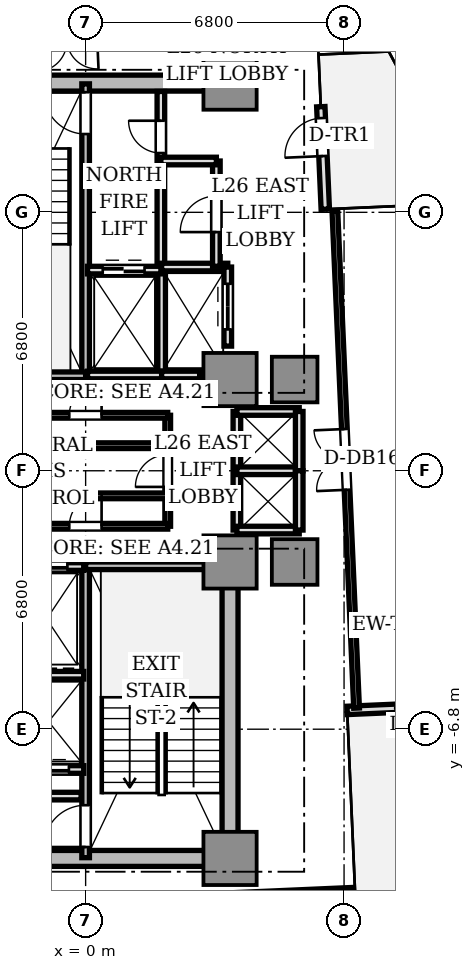
"""IFC4 building model, lengths in metres.
Left out: names, types, materials, properties, quantities, classifications, styles, units other than length and angle.
Written with IfcOpenShell. Run it as: python <this file> out.ifc"""

import sys

from ifc_helpers import new_model, si_unit, direction, frame, frame_2d, origin, origin_2d, place, context, subcontext, project, spatial, rectangle, extrude, source, transform, mapped, element, fill, save


model = new_model("IFC4")
c1 = context("Model", 3, precision=1e-05, world=origin(), true_north=direction((0.0, 1.0)))
c2 = subcontext(c1, "Body", "Model", "MODEL_VIEW")
j1 = project(units=[si_unit("LENGTHUNIT", "METRE"), si_unit("PLANEANGLEUNIT", "RADIAN")], contexts=[c1])
p1 = place(None, origin())
s1 = spatial("IfcSite", under=j1, at=p1, CompositionType="ELEMENT")
p2 = place(p1, origin())
s2 = spatial("IfcBuilding", under=s1, at=p2, CompositionType="ELEMENT")
p3 = place(p2, frame((0.0, 0.0, 96.9)))
s3 = spatial("IfcBuildingStorey", under=s2, at=p3, CompositionType="ELEMENT", Elevation=96.9)
for number, where, z_axis, x_axis in (
    (1, (-3.55, 10.2, 0.0), (0.0, 0.0, 1.0), (1.0, 0.0, 0.0)),
    (2, (-3.55, -10.2, 0.0), (0.0, 0.0, 1.0), (1.0, 0.0, 0.0)),
):
    element("IfcWall", number, at=place(p3, frame(where, z_axis=z_axis, x_axis=x_axis)), inside=s3, PredefinedType="SHEAR", context=c2, shape_type="SweptSolid", body=[
        extrude(rectangle(XDim=7.1, YDim=0.42, at=frame_2d((3.55, 0.0))), origin(), (0.0, 0.0, 1.0), 3.11),
    ])
p4 = place(p3, frame((3.8, -9.75, 0.0), z_axis=(0.0, 0.0, 1.0), x_axis=(0.0, 1.0, 0.0)))
e3 = element("IfcWall", 3, at=p4, inside=s3, PredefinedType="SHEAR", context=c2, shape_type="SweptSolid", body=[
    extrude(rectangle(XDim=6.9, YDim=0.42, at=frame_2d((3.45, 0.0))), origin(), (0.0, 0.0, 1.0), 3.11),
])
m1 = source(origin(), c2, "Body", "SweptSolid", [
    extrude(rectangle(XDim=1.4, YDim=1.4, at=origin_2d()), origin(), (0.0, 0.0, 1.0), 3.11),
])
for number, where, z_axis, x_axis in (
    (4, (3.8, 2.4, 0.0), (0.0, 0.0, 1.0), (1.0, 0.0, 0.0)),
    (5, (3.8, 10.2, 0.0), (0.0, 0.0, 1.0), (1.0, 0.0, 0.0)),
    (6, (3.8, -2.4, 0.0), (0.0, 0.0, 1.0), (1.0, 0.0, 0.0)),
    (7, (3.8, -10.2, 0.0), (0.0, 0.0, 1.0), (1.0, 0.0, 0.0)),
):
    element("IfcColumn", number, at=place(p3, frame(where, z_axis=z_axis, x_axis=x_axis)), inside=s3, PredefinedType="COLUMN", context=c2, shape_type="MappedRepresentation", body=[
        mapped(m1, transform((0.0, 0.0, 0.0), scale=1.0)),
    ])
m2 = source(origin(), c2, "Body", "SweptSolid", [
    extrude(rectangle(XDim=1.2, YDim=1.2, at=origin_2d()), origin(), (0.0, 0.0, 1.0), 3.11),
])
for number, where, z_axis, x_axis in (
    (8, (5.5, 2.4, 0.0), (0.0, 0.0, 1.0), (1.0, 0.0, 0.0)),
    (9, (5.5, -2.4, 0.0), (0.0, 0.0, 1.0), (1.0, 0.0, 0.0)),
):
    element("IfcColumn", number, at=place(p3, frame(where, z_axis=z_axis, x_axis=x_axis)), inside=s3, PredefinedType="COLUMN", context=c2, shape_type="MappedRepresentation", body=[
        mapped(m2, transform((0.0, 0.0, 0.0), scale=1.0)),
    ])
p5 = place(p3, frame((6.882, -6.306, 0.0), z_axis=(0.0, 0.0, 1.0), x_axis=(0.999045894436, 0.043672655174, 0.0)))
e10 = element("IfcWall", 10, at=p5, inside=s3, PredefinedType="STANDARD", context=c2, shape_type="SweptSolid", body=[
    extrude(rectangle(XDim=2.7, YDim=0.22, at=frame_2d((1.35, 0.0))), origin(), (0.0, 0.0, 1.0), 3.11),
])
p6 = place(p5, frame((1.4, 0.0, 0.0)))
e11 = element("IfcOpeningElement", 11, at=p6, cuts=e10, PredefinedType="OPENING", context=c2, shape_type="SweptSolid", body=[
    extrude(rectangle(XDim=1.0, YDim=2.2, at=frame_2d((0.5, 1.1))), frame((0.0, 0.12, 0.0), z_axis=(0.0, -1.0, 0.0), x_axis=(1.0, 0.0, 0.0)), (0.0, 0.0, 1.0), 0.24),
])
p7 = place(p3, frame((6.306, 6.882, 0.0), z_axis=(0.0, 0.0, 1.0), x_axis=(-0.043672655174, 0.999045894436, 0.0)))
e12 = element("IfcWall", 12, at=p7, inside=s3, PredefinedType="STANDARD", context=c2, shape_type="SweptSolid", body=[
    extrude(rectangle(XDim=2.7, YDim=0.22, at=frame_2d((1.35, 0.0))), origin(), (0.0, 0.0, 1.0), 3.11),
])
p8 = place(p7, frame((1.4, 0.0, 0.0)))
e13 = element("IfcOpeningElement", 13, at=p8, cuts=e12, PredefinedType="OPENING", context=c2, shape_type="SweptSolid", body=[
    extrude(rectangle(XDim=1.0, YDim=2.2, at=frame_2d((0.5, 1.1))), frame((0.0, 0.12, 0.0), z_axis=(0.0, -1.0, 0.0), x_axis=(1.0, 0.0, 0.0)), (0.0, 0.0, 1.0), 0.24),
])
p9 = place(p3, frame((0.0, 2.5, 0.0), z_axis=(0.0, 0.0, 1.0), x_axis=(0.0, 1.0, 0.0)))
e14 = element("IfcWall", 14, at=p9, inside=s3, PredefinedType="SOLIDWALL", context=c2, shape_type="SweptSolid", body=[
    extrude(rectangle(XDim=7.68, YDim=0.2, at=frame_2d((3.84, 0.0))), origin(), (0.0, 0.0, 1.0), 3.11),
])
p10 = place(p9, frame((6.36, 0.0, 0.0)))
e15 = element("IfcOpeningElement", 15, at=p10, cuts=e14, PredefinedType="OPENING", context=c2, shape_type="SweptSolid", body=[
    extrude(rectangle(XDim=1.1, YDim=2.15, at=frame_2d((0.55, 1.075))), frame((0.0, 0.11, 0.0), z_axis=(0.0, -1.0, 0.0), x_axis=(1.0, 0.0, 0.0)), (0.0, 0.0, 1.0), 0.22),
])
p11 = place(p3, frame((-3.72, 2.5, 0.0), z_axis=(0.0, 0.0, 1.0), x_axis=(1.0, 0.0, 0.0)))
e16 = element("IfcWall", 16, at=p11, inside=s3, PredefinedType="SOLIDWALL", context=c2, shape_type="SweptSolid", body=[
    extrude(rectangle(XDim=3.72, YDim=0.2, at=frame_2d((1.86, 0.0))), origin(), (0.0, 0.0, 1.0), 3.11),
])
p12 = place(p3, frame((0.0, -10.18, 0.0), z_axis=(0.0, 0.0, 1.0), x_axis=(0.0, 1.0, 0.0)))
e17 = element("IfcWall", 17, at=p12, inside=s3, PredefinedType="SOLIDWALL", context=c2, shape_type="SweptSolid", body=[
    extrude(rectangle(XDim=7.68, YDim=0.2, at=frame_2d((3.84, 0.0))), origin(), (0.0, 0.0, 1.0), 3.11),
])
p13 = place(p12, frame((0.28, 0.0, 0.0)))
e18 = element("IfcOpeningElement", 18, at=p13, cuts=e17, PredefinedType="OPENING", context=c2, shape_type="SweptSolid", body=[
    extrude(rectangle(XDim=1.1, YDim=2.15, at=frame_2d((0.55, 1.075))), frame((0.0, 0.11, 0.0), z_axis=(0.0, -1.0, 0.0), x_axis=(1.0, 0.0, 0.0)), (0.0, 0.0, 1.0), 0.22),
])
p14 = place(p3, frame((0.0, -2.5, 0.0), z_axis=(0.0, 0.0, 1.0), x_axis=(1.0, 0.0, 0.0)))
e19 = element("IfcWall", 19, at=p14, inside=s3, PredefinedType="SOLIDWALL", context=c2, shape_type="SweptSolid", body=[
    extrude(rectangle(XDim=3.72, YDim=0.2, at=frame_2d((1.86, 0.0))), origin(), (0.0, 0.0, 1.0), 3.11),
])
p15 = place(p3, frame((1.98, 5.32, 0.0), z_axis=(0.0, 0.0, 1.0), x_axis=(0.0, 1.0, 0.0)))
e20 = element("IfcWall", 20, at=p15, inside=s3, PredefinedType="SOLIDWALL", context=c2, shape_type="SweptSolid", body=[
    extrude(rectangle(XDim=4.66, YDim=0.2, at=frame_2d((2.33, 0.0))), origin(), (0.0, 0.0, 1.0), 2.66),
])
p16 = place(p15, frame((3.04, 0.0, 0.0)))
e21 = element("IfcOpeningElement", 21, at=p16, cuts=e20, PredefinedType="OPENING", context=c2, shape_type="SweptSolid", body=[
    extrude(rectangle(XDim=0.85, YDim=2.1, at=frame_2d((0.425, 1.05))), frame((0.0, 0.11, 0.0), z_axis=(0.0, -1.0, 0.0), x_axis=(1.0, 0.0, 0.0)), (0.0, 0.0, 1.0), 0.22),
])
p17 = place(p3, frame((2.0, 2.5, 0.0), z_axis=(0.0, 0.0, 1.0), x_axis=(0.0, 1.0, 0.0)))
e22 = element("IfcWall", 22, at=p17, inside=s3, PredefinedType="SOLIDWALL", context=c2, shape_type="SweptSolid", body=[
    extrude(rectangle(XDim=2.78, YDim=0.2, at=frame_2d((1.39, 0.0))), origin(), (0.0, 0.0, 1.0), 2.66),
])
p18 = place(p3, frame((0.05, 2.52, 0.0), z_axis=(0.0, 0.0, 1.0), x_axis=(1.0, 0.0, 0.0)))
e23 = element("IfcWall", 23, at=p18, inside=s3, PredefinedType="SOLIDWALL", context=c2, shape_type="SweptSolid", body=[
    extrude(rectangle(XDim=1.95, YDim=0.2, at=frame_2d((0.975, 0.0))), origin(), (0.0, 0.0, 1.0), 2.66),
])
p19 = place(p3, frame((0.05, 5.28, 0.0), z_axis=(0.0, 0.0, 1.0), x_axis=(1.0, 0.0, 0.0)))
e24 = element("IfcWall", 24, at=p19, inside=s3, PredefinedType="SOLIDWALL", context=c2, shape_type="SweptSolid", body=[
    extrude(rectangle(XDim=1.93, YDim=0.2, at=frame_2d((0.965, 0.0))), origin(), (0.0, 0.0, 1.0), 2.66),
])
p20 = place(p19, frame((0.4, 0.0, 0.0)))
e25 = element("IfcOpeningElement", 25, at=p20, cuts=e24, PredefinedType="OPENING", context=c2, shape_type="SweptSolid", body=[
    extrude(rectangle(XDim=1.1, YDim=2.2, at=frame_2d((0.55, 1.1))), frame((0.0, 0.11, 0.0), z_axis=(0.0, -1.0, 0.0), x_axis=(1.0, 0.0, 0.0)), (0.0, 0.0, 1.0), 0.22),
])
p21 = place(p3, frame((-2.0, -2.52, 0.0), z_axis=(0.0, 0.0, 1.0), x_axis=(1.0, 0.0, 0.0)))
e26 = element("IfcWall", 26, at=p21, inside=s3, PredefinedType="SOLIDWALL", context=c2, shape_type="SweptSolid", body=[
    extrude(rectangle(XDim=1.95, YDim=0.2, at=frame_2d((0.975, 0.0))), origin(), (0.0, 0.0, 1.0), 2.66),
])
p22 = place(p21, frame((0.42, 0.0, 0.0)))
e27 = element("IfcOpeningElement", 27, at=p22, cuts=e26, PredefinedType="OPENING", context=c2, shape_type="SweptSolid", body=[
    extrude(rectangle(XDim=1.1, YDim=2.2, at=frame_2d((0.55, 1.1))), frame((0.0, 0.11, 0.0), z_axis=(0.0, -1.0, 0.0), x_axis=(1.0, 0.0, 0.0)), (0.0, 0.0, 1.0), 0.22),
])
p23 = place(p3, frame((2.0, 2.52, 0.0), z_axis=(0.0, 0.0, 1.0), x_axis=(1.0, 0.0, 0.0)))
e28 = element("IfcWall", 28, at=p23, inside=s3, PredefinedType="SOLIDWALL", context=c2, shape_type="SweptSolid", body=[
    extrude(rectangle(XDim=1.0, YDim=0.2, at=frame_2d((0.5, 0.0))), origin(), (0.0, 0.0, 1.0), 2.66),
])
p24 = place(p3, frame((2.0, 5.36, 0.0), z_axis=(0.0, 0.0, 1.0), x_axis=(1.0, 0.0, 0.0)))
e29 = element("IfcWall", 29, at=p24, inside=s3, PredefinedType="SOLIDWALL", context=c2, shape_type="SweptSolid", body=[
    extrude(rectangle(XDim=1.74, YDim=0.2, at=frame_2d((0.87, 0.0))), origin(), (0.0, 0.0, 1.0), 2.66),
])
p25 = place(p3, frame((3.74, 3.28, 0.0), z_axis=(0.0, 0.0, 1.0), x_axis=(0.0, 1.0, 0.0)))
e30 = element("IfcWall", 30, at=p25, inside=s3, PredefinedType="SOLIDWALL", context=c2, shape_type="SweptSolid", body=[
    extrude(rectangle(XDim=2.08, YDim=0.2, at=frame_2d((1.04, 0.0))), origin(), (0.0, 0.0, 1.0), 2.66),
])
p26 = place(p25, frame((0.44, 0.0, 0.0)))
e31 = element("IfcOpeningElement", 31, at=p26, cuts=e30, PredefinedType="OPENING", context=c2, shape_type="SweptSolid", body=[
    extrude(rectangle(XDim=1.2, YDim=2.2, at=frame_2d((0.6, 1.1))), frame((0.0, 0.11, 0.0), z_axis=(0.0, -1.0, 0.0), x_axis=(1.0, 0.0, 0.0)), (0.0, 0.0, 1.0), 0.22),
])
p27 = place(p3, frame((-3.74, -5.38, 0.0), z_axis=(0.0, 0.0, 1.0), x_axis=(1.0, 0.0, 0.0)))
e32 = element("IfcWall", 32, at=p27, inside=s3, PredefinedType="SOLIDWALL", context=c2, shape_type="SweptSolid", body=[
    extrude(rectangle(XDim=3.69, YDim=0.2, at=frame_2d((1.845, 0.0))), origin(), (0.0, 0.0, 1.0), 2.66),
])
p28 = place(p3, frame((-1.9, -7.86, 0.0), z_axis=(0.0, 0.0, 1.0), x_axis=(1.0, 0.0, 0.0)))
e33 = element("IfcWall", 33, at=p28, inside=s3, PredefinedType="SOLIDWALL", context=c2, shape_type="SweptSolid", body=[
    extrude(rectangle(XDim=1.85, YDim=0.2, at=frame_2d((0.925, 0.0))), origin(), (0.0, 0.0, 1.0), 2.66),
])
p29 = place(p28, frame((0.36, 0.0, 0.0)))
e34 = element("IfcOpeningElement", 34, at=p29, cuts=e33, PredefinedType="OPENING", context=c2, shape_type="SweptSolid", body=[
    extrude(rectangle(XDim=1.1, YDim=2.2, at=frame_2d((0.55, 1.1))), frame((0.0, 0.11, 0.0), z_axis=(0.0, -1.0, 0.0), x_axis=(1.0, 0.0, 0.0)), (0.0, 0.0, 1.0), 0.22),
])
p30 = place(p3, frame((3.98, -1.56, 0.0), z_axis=(0.0, 0.0, 1.0), x_axis=(0.0, 1.0, 0.0)))
e35 = element("IfcWall", 35, at=p30, inside=s3, PredefinedType="SOLIDWALL", context=c2, shape_type="SweptSolid", body=[
    extrude(rectangle(XDim=3.12, YDim=0.2, at=frame_2d((1.56, 0.0))), origin(), (0.0, 0.0, 1.0), 2.28),
])
for number, where, z_axis, x_axis in (
    (36, (3.98, 1.56, 0.0), (0.0, 0.0, 1.0), (1.0, 0.0, 0.0)),
    (37, (3.98, -1.56, 0.0), (0.0, 0.0, 1.0), (1.0, 0.0, 0.0)),
    (38, (3.98, 0.0, 0.0), (0.0, 0.0, 1.0), (1.0, 0.0, 0.0)),
):
    element("IfcWall", number, at=place(p3, frame(where, z_axis=z_axis, x_axis=x_axis)), inside=s3, PredefinedType="SOLIDWALL", context=c2, shape_type="SweptSolid", body=[
        extrude(rectangle(XDim=1.64, YDim=0.2, at=frame_2d((0.82, 0.0))), origin(), (0.0, 0.0, 1.0), 2.66),
    ])
for number, where, z_axis, x_axis in (
    (39, (5.62, 0.0, 0.0), (0.0, 0.0, 1.0), (0.0, 1.0, 0.0)),
    (40, (5.62, -1.56, 0.0), (0.0, 0.0, 1.0), (0.0, 1.0, 0.0)),
):
    element("IfcWall", number, at=place(p3, frame(where, z_axis=z_axis, x_axis=x_axis)), inside=s3, PredefinedType="SOLIDWALL", context=c2, shape_type="SweptSolid", body=[
        extrude(rectangle(XDim=1.56, YDim=0.2, at=frame_2d((0.78, 0.0))), origin(), (0.0, 0.0, 1.0), 2.66),
    ])
p31 = place(p3, frame((-3.74, -8.56, 0.0), z_axis=(0.0, 0.0, 1.0), x_axis=(1.0, 0.0, 0.0)))
e41 = element("IfcWall", 41, at=p31, inside=s3, PredefinedType="SOLIDWALL", context=c2, shape_type="SweptSolid", body=[
    extrude(rectangle(XDim=3.62, YDim=0.2, at=frame_2d((1.81, 0.0))), origin(), (0.0, 0.0, 1.0), 2.66),
])
p32 = place(p31, frame((1.0, 0.0, 0.0)))
e42 = element("IfcOpeningElement", 42, at=p32, cuts=e41, PredefinedType="OPENING", context=c2, shape_type="SweptSolid", body=[
    extrude(rectangle(XDim=0.95, YDim=2.15, at=frame_2d((0.475, 1.075))), frame((0.0, 0.11, 0.0), z_axis=(0.0, -1.0, 0.0), x_axis=(1.0, 0.0, 0.0)), (0.0, 0.0, 1.0), 0.22),
])
p33 = place(p3, frame((3.44, 5.38, 0.0), z_axis=(0.0, 0.0, 1.0), x_axis=(0.0, 1.0, 0.0)))
e43 = element("IfcWall", 43, at=p33, inside=s3, PredefinedType="SOLIDWALL", context=c2, shape_type="SweptSolid", body=[
    extrude(rectangle(XDim=2.77, YDim=0.2, at=frame_2d((1.385, 0.0))), origin(), (0.0, 0.0, 1.0), 2.66),
])
p34 = place(p33, frame((0.9, 0.0, 0.0)))
e44 = element("IfcOpeningElement", 44, at=p34, cuts=e43, PredefinedType="OPENING", context=c2, shape_type="SweptSolid", body=[
    extrude(rectangle(XDim=0.95, YDim=2.15, at=frame_2d((0.475, 1.075))), frame((0.0, 0.11, 0.0), z_axis=(0.0, -1.0, 0.0), x_axis=(1.0, 0.0, 0.0)), (0.0, 0.0, 1.0), 0.22),
])
p35 = place(p3, frame((1.98, 8.15, 0.0), z_axis=(0.0, 0.0, 1.0), x_axis=(1.0, 0.0, 0.0)))
e45 = element("IfcWall", 45, at=p35, inside=s3, PredefinedType="SOLIDWALL", context=c2, shape_type="SweptSolid", body=[
    extrude(rectangle(XDim=1.46, YDim=0.2, at=frame_2d((0.73, 0.0))), origin(), (0.0, 0.0, 1.0), 2.66),
])
p36 = place(p3, frame((2.16, -1.46, 0.0), z_axis=(0.0, 0.0, 1.0), x_axis=(0.0, 1.0, 0.0)))
e46 = element("IfcWall", 46, at=p36, inside=s3, PredefinedType="PARTITIONING", context=c2, shape_type="SweptSolid", body=[
    extrude(rectangle(XDim=2.92, YDim=0.15, at=frame_2d((1.46, 0.0))), origin(), (0.0, 0.0, 1.0), 2.66),
])
p37 = place(p36, frame((1.035, 0.0, 0.0)))
e47 = element("IfcOpeningElement", 47, at=p37, cuts=e46, PredefinedType="OPENING", context=c2, shape_type="SweptSolid", body=[
    extrude(rectangle(XDim=0.85, YDim=2.1, at=frame_2d((0.425, 1.05))), frame((0.0, 0.085, 0.0), z_axis=(0.0, -1.0, 0.0), x_axis=(1.0, 0.0, 0.0)), (0.0, 0.0, 1.0), 0.17),
])
p38 = place(p3, frame((-2.16, 1.46, 0.0), z_axis=(0.0, 0.0, 1.0), x_axis=(1.0, 0.0, 0.0)))
e48 = element("IfcWall", 48, at=p38, inside=s3, PredefinedType="PARTITIONING", context=c2, shape_type="SweptSolid", body=[
    extrude(rectangle(XDim=4.32, YDim=0.15, at=frame_2d((2.16, 0.0))), origin(), (0.0, 0.0, 1.0), 2.66),
])
p39 = place(p38, frame((1.73, 0.0, 0.0)))
e49 = element("IfcOpeningElement", 49, at=p39, cuts=e48, PredefinedType="OPENING", context=c2, shape_type="SweptSolid", body=[
    extrude(rectangle(XDim=0.85, YDim=2.1, at=frame_2d((0.425, 1.05))), frame((0.0, 0.085, 0.0), z_axis=(0.0, -1.0, 0.0), x_axis=(1.0, 0.0, 0.0)), (0.0, 0.0, 1.0), 0.17),
])
p40 = place(p3, frame((-2.16, -1.46, 0.0), z_axis=(0.0, 0.0, 1.0), x_axis=(1.0, 0.0, 0.0)))
e50 = element("IfcWall", 50, at=p40, inside=s3, PredefinedType="PARTITIONING", context=c2, shape_type="SweptSolid", body=[
    extrude(rectangle(XDim=4.32, YDim=0.15, at=frame_2d((2.16, 0.0))), origin(), (0.0, 0.0, 1.0), 2.66),
])
p41 = place(p40, frame((1.73, 0.0, 0.0)))
e51 = element("IfcOpeningElement", 51, at=p41, cuts=e50, PredefinedType="OPENING", context=c2, shape_type="SweptSolid", body=[
    extrude(rectangle(XDim=0.85, YDim=2.1, at=frame_2d((0.425, 1.05))), frame((0.0, 0.085, 0.0), z_axis=(0.0, -1.0, 0.0), x_axis=(1.0, 0.0, 0.0)), (0.0, 0.0, 1.0), 0.17),
])
for number, where, z_axis, x_axis in (
    (52, (-2.16, 0.66, 0.0), (0.0, 0.0, 1.0), (1.0, 0.0, 0.0)),
    (53, (-2.16, -0.66, 0.0), (0.0, 0.0, 1.0), (1.0, 0.0, 0.0)),
):
    element("IfcWall", number, at=place(p3, frame(where, z_axis=z_axis, x_axis=x_axis)), inside=s3, PredefinedType="PARTITIONING", context=c2, shape_type="SweptSolid", body=[
        extrude(rectangle(XDim=4.32, YDim=0.15, at=frame_2d((2.16, 0.0))), origin(), (0.0, 0.0, 1.0), 2.66),
    ])
p42 = place(p3, frame((7.129, -6.245, 0.0), z_axis=(0.0, 0.0, 1.0), x_axis=(-0.043609488494, 0.999048653727, 0.0)))
e54 = element("IfcWall", 54, at=p42, inside=s3, PredefinedType="PARTITIONING", context=c2, shape_type="SweptSolid", body=[
    extrude(rectangle(XDim=13.1, YDim=0.15, at=frame_2d((6.55, 0.0))), origin(), (0.0, 0.0, 1.0), 2.66),
])
p43 = place(p42, frame((5.75, 0.0, 0.0)))
e55 = element("IfcOpeningElement", 55, at=p43, cuts=e54, PredefinedType="OPENING", context=c2, shape_type="SweptSolid", body=[
    extrude(rectangle(XDim=1.6, YDim=2.25, at=frame_2d((0.8, 1.125))), frame((0.0, 0.085, 0.0), z_axis=(0.0, -1.0, 0.0), x_axis=(1.0, 0.0, 0.0)), (0.0, 0.0, 1.0), 0.17),
])
p44 = place(p3, frame((6.049, 11.625, 0.0), z_axis=(0.0, 0.0, 1.0), x_axis=(-0.999047806124, -0.043628901879, 0.0)))
e56 = element("IfcWall", 56, at=p44, inside=s3, PredefinedType="PARTITIONING", context=c2, shape_type="SweptSolid", body=[
    extrude(rectangle(XDim=13.1, YDim=0.15, at=frame_2d((6.55, 0.0))), origin(), (0.0, 0.0, 1.0), 2.66),
])
p45 = place(p44, frame((5.75, 0.0, 0.0)))
e57 = element("IfcOpeningElement", 57, at=p45, cuts=e56, PredefinedType="OPENING", context=c2, shape_type="SweptSolid", body=[
    extrude(rectangle(XDim=1.6, YDim=2.25, at=frame_2d((0.8, 1.125))), frame((0.0, 0.085, 0.0), z_axis=(0.0, -1.0, 0.0), x_axis=(1.0, 0.0, 0.0)), (0.0, 0.0, 1.0), 0.17),
])
p46 = place(p3, frame((3.542, -11.206, 0.0), z_axis=(0.0, 0.0, 1.0), x_axis=(0.999046129111, 0.04366728647, 0.0)))
e58 = element("IfcWall", 58, at=p46, inside=s3, PredefinedType="PARTITIONING", context=c2, shape_type="SweptSolid", body=[
    extrude(rectangle(XDim=3.5, YDim=0.18, at=frame_2d((1.75, 0.0))), origin(), (0.0, 0.0, 1.0), 2.66),
])
m3 = source(origin(), c2, "Body", "SweptSolid", [
    extrude(rectangle(XDim=1.0, YDim=0.05, at=origin_2d()), origin(), (0.0, 0.0, 1.0), 2.2),
])
p47 = place(p8, frame((0.5, 0.0, 0.0)))
e59 = element("IfcDoor", 59, at=p47, inside=s3, OperationType="SINGLE_SWING_LEFT", PredefinedType="DOOR", context=c2, shape_type="MappedRepresentation", body=[
    mapped(m3, transform((0.0, 0.0, 0.0), scale=1.0)),
])
fill(e13, e59)
m4 = source(origin(), c2, "Body", "SweptSolid", [
    extrude(rectangle(XDim=1.1, YDim=0.05, at=origin_2d()), origin(), (0.0, 0.0, 1.0), 2.15),
])
p48 = place(p10, frame((0.55, 0.0, 0.0)))
e60 = element("IfcDoor", 60, at=p48, inside=s3, OperationType="SINGLE_SWING_RIGHT", PredefinedType="DOOR", context=c2, shape_type="MappedRepresentation", body=[
    mapped(m4, transform((0.0, 0.0, 0.0), scale=1.0)),
])
fill(e15, e60)
m5 = source(origin(), c2, "Body", "SweptSolid", [
    extrude(rectangle(XDim=0.85, YDim=0.05, at=origin_2d()), origin(), (0.0, 0.0, 1.0), 2.1),
])
p49 = place(p16, frame((0.425, 0.0, 0.0)))
e61 = element("IfcDoor", 61, at=p49, inside=s3, OperationType="SINGLE_SWING_RIGHT", PredefinedType="DOOR", context=c2, shape_type="MappedRepresentation", body=[
    mapped(m5, transform((0.0, 0.0, 0.0), scale=1.0)),
])
fill(e21, e61)
m6 = source(origin(), c2, "Body", "SweptSolid", [
    extrude(rectangle(XDim=1.1, YDim=0.05, at=origin_2d()), origin(), (0.0, 0.0, 1.0), 2.2),
])
p50 = place(p20, frame((0.55, 0.0, 0.0)))
e62 = element("IfcDoor", 62, at=p50, inside=s3, OperationType="DOUBLE_DOOR_SLIDING", PredefinedType="DOOR", context=c2, shape_type="MappedRepresentation", body=[
    mapped(m6, transform((0.0, 0.0, 0.0), scale=1.0)),
])
fill(e25, e62)
p51 = place(p22, frame((0.55, 0.0, 0.0)))
e63 = element("IfcDoor", 63, at=p51, inside=s3, OperationType="DOUBLE_DOOR_SLIDING", PredefinedType="DOOR", context=c2, shape_type="MappedRepresentation", body=[
    mapped(m6, transform((0.0, 0.0, 0.0), scale=1.0)),
])
fill(e27, e63)
m7 = source(origin(), c2, "Body", "SweptSolid", [
    extrude(rectangle(XDim=1.2, YDim=0.05, at=origin_2d()), origin(), (0.0, 0.0, 1.0), 2.2),
])
p52 = place(p26, frame((0.6, 0.0, 0.0)))
e64 = element("IfcDoor", 64, at=p52, inside=s3, OperationType="DOUBLE_DOOR_SLIDING", PredefinedType="DOOR", context=c2, shape_type="MappedRepresentation", body=[
    mapped(m7, transform((0.0, 0.0, 0.0), scale=1.0)),
])
fill(e31, e64)
p53 = place(p29, frame((0.55, 0.0, 0.0)))
e65 = element("IfcDoor", 65, at=p53, inside=s3, OperationType="DOUBLE_DOOR_SLIDING", PredefinedType="DOOR", context=c2, shape_type="MappedRepresentation", body=[
    mapped(m6, transform((0.0, 0.0, 0.0), scale=1.0)),
])
fill(e34, e65)
p54 = place(p13, frame((0.55, 0.0, 0.0)))
e66 = element("IfcDoor", 66, at=p54, inside=s3, OperationType="SINGLE_SWING_LEFT", PredefinedType="DOOR", context=c2, shape_type="MappedRepresentation", body=[
    mapped(m4, transform((0.0, 0.0, 0.0), scale=1.0)),
])
fill(e18, e66)
m8 = source(origin(), c2, "Body", "SweptSolid", [
    extrude(rectangle(XDim=0.95, YDim=0.05, at=origin_2d()), origin(), (0.0, 0.0, 1.0), 2.15),
])
p55 = place(p34, frame((0.475, 0.0, 0.0)))
e67 = element("IfcDoor", 67, at=p55, inside=s3, OperationType="SINGLE_SWING_LEFT", PredefinedType="DOOR", context=c2, shape_type="MappedRepresentation", body=[
    mapped(m8, transform((0.0, 0.0, 0.0), scale=1.0)),
])
fill(e44, e67)
p56 = place(p39, frame((0.425, 0.0, 0.0)))
e68 = element("IfcDoor", 68, at=p56, inside=s3, OperationType="SINGLE_SWING_RIGHT", PredefinedType="DOOR", context=c2, shape_type="MappedRepresentation", body=[
    mapped(m5, transform((0.0, 0.0, 0.0), scale=1.0)),
])
fill(e49, e68)
p57 = place(p37, frame((0.425, 0.0, 0.0)))
e69 = element("IfcDoor", 69, at=p57, inside=s3, OperationType="SINGLE_SWING_LEFT", PredefinedType="DOOR", context=c2, shape_type="MappedRepresentation", body=[
    mapped(m5, transform((0.0, 0.0, 0.0), scale=1.0)),
])
fill(e47, e69)
p58 = place(p41, frame((0.425, 0.0, 0.0)))
e70 = element("IfcDoor", 70, at=p58, inside=s3, OperationType="SINGLE_SWING_RIGHT", PredefinedType="DOOR", context=c2, shape_type="MappedRepresentation", body=[
    mapped(m5, transform((0.0, 0.0, 0.0), scale=1.0)),
])
fill(e51, e70)
m9 = source(origin(), c2, "Body", "SweptSolid", [
    extrude(rectangle(XDim=1.6, YDim=0.05, at=origin_2d()), origin(), (0.0, 0.0, 1.0), 2.25),
])
p59 = place(p43, frame((0.8, 0.0, 0.0)))
e71 = element("IfcDoor", 71, at=p59, inside=s3, OperationType="DOUBLE_DOOR_SINGLE_SWING", PredefinedType="DOOR", context=c2, shape_type="MappedRepresentation", body=[
    mapped(m9, transform((0.0, 0.0, 0.0), scale=1.0)),
])
fill(e55, e71)
save(model, sys.argv[1])
